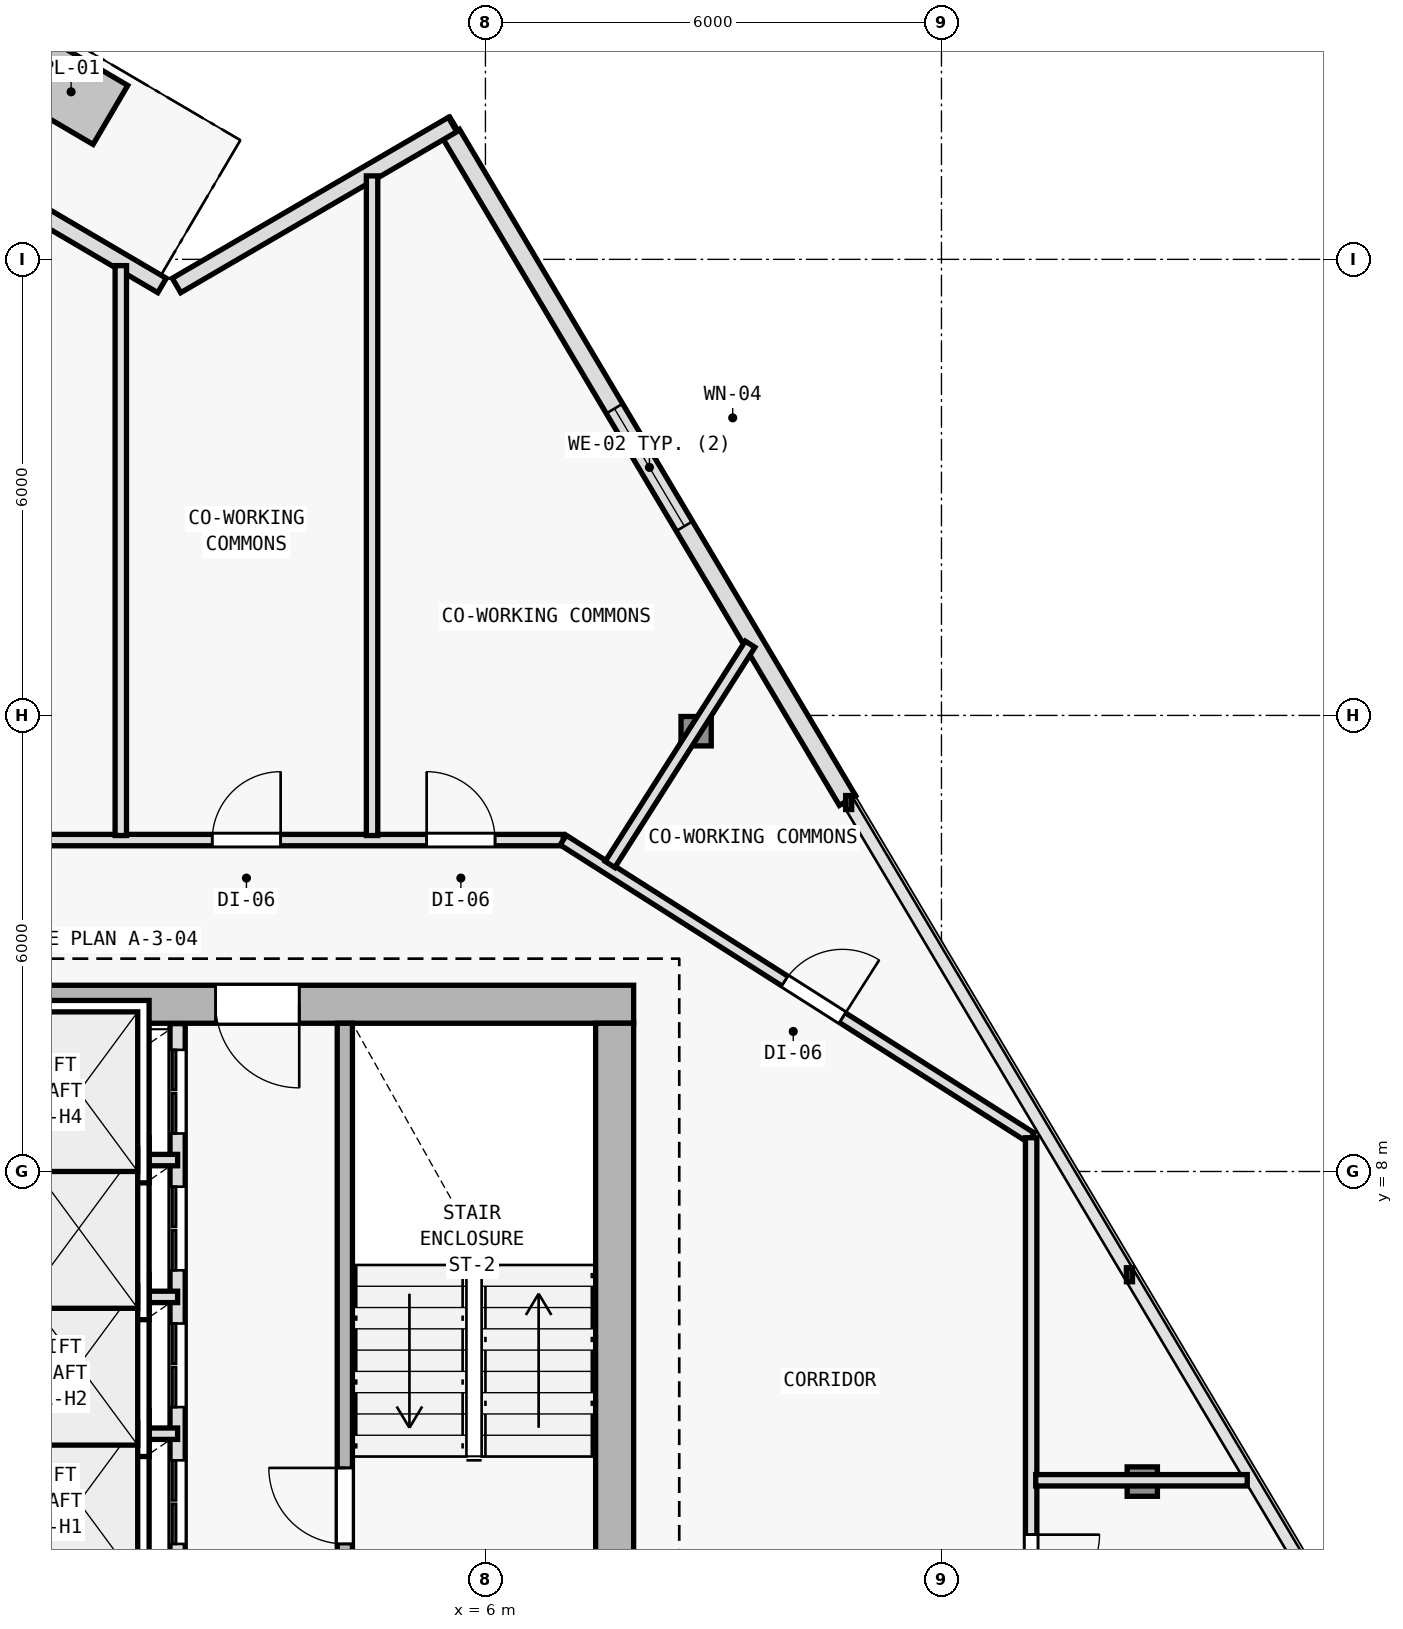
"""IFC4 building model, lengths in metres.
Left out: names, types, materials, properties, quantities, classifications, styles, units other than length and angle.
Written with IfcOpenShell. Run it as: python <this file> out.ifc"""

import sys

from ifc_helpers import new_model, si_unit, direction, frame, frame_2d, origin, origin_2d, place, context, subcontext, project, spatial, rectangle, i_section, extrude, element, fill, save


model = new_model("IFC4")
c1 = context("Model", 3, precision=1e-05, world=origin(), true_north=direction((0.0, 1.0)))
c2 = subcontext(c1, "Body", "Model", "MODEL_VIEW")
j1 = project(units=[si_unit("LENGTHUNIT", "METRE"), si_unit("PLANEANGLEUNIT", "RADIAN")], contexts=[c1])
p1 = place(None, origin())
s1 = spatial("IfcSite", under=j1, at=p1, CompositionType="ELEMENT")
p2 = place(p1, origin())
s2 = spatial("IfcBuilding", under=s1, at=p2, CompositionType="ELEMENT")
p3 = place(p2, frame((0.0, 0.0, 212.7)))
s3 = spatial("IfcBuildingStorey", under=s2, at=p3, CompositionType="ELEMENT", Elevation=212.7)
p4 = place(p3, frame((7.7, 10.2, 0.0), z_axis=(0.0, 0.0, 1.0), x_axis=(1.0, 0.0, 0.0)))
e1 = element("IfcColumn", 1, at=p4, inside=s3, PredefinedType="COLUMN", context=c2, shape_type="SweptSolid", body=[
    extrude(i_section(OverallWidth=0.398, OverallDepth=0.387, WebThickness=0.013, FlangeThickness=0.022, FilletRadius=0.015, at=origin_2d()), origin(), (0.0, 0.0, 1.0), 3.6),
])
p5 = place(p3, frame((14.642, 3.92, 0.006), z_axis=(-0.018907326549, 0.00952167524, 0.999775900241), x_axis=(-0.449781931574, -0.893138406984, 0.0)))
e2 = element("IfcColumn", 2, at=p5, inside=s3, PredefinedType="COLUMN", context=c2, shape_type="SweptSolid", body=[
    extrude(i_section(OverallWidth=0.398, OverallDepth=0.387, WebThickness=0.013, FlangeThickness=0.022, FilletRadius=0.015, at=origin_2d()), origin(), (0.0, 0.0, 1.0), 3.59),
])
p6 = place(p3, frame((8.772, 13.792, 0.006), z_axis=(-0.011767853257, -0.00258484638, 0.999927415465), x_axis=(0.214538664031, -0.976715496773, 0.0)))
e3 = element("IfcColumn", 3, at=p6, inside=s3, PredefinedType="COLUMN", context=c2, shape_type="SweptSolid", body=[
    extrude(i_section(OverallWidth=0.398, OverallDepth=0.387, WebThickness=0.013, FlangeThickness=0.022, FilletRadius=0.015, at=origin_2d()), origin(), (0.0, 0.0, 1.0), 3.589),
])
p7 = place(p3, frame((5.551, 21.647, 0.0), z_axis=(0.0, 0.0, 1.0), x_axis=(0.511094988088, -0.859524236512, 0.0)))
e4 = element("IfcWall", 4, at=p7, inside=s3, PredefinedType="SOLIDWALL", context=c2, shape_type="SweptSolid", body=[
    extrude(rectangle(XDim=10.2, YDim=0.25, at=frame_2d((5.1, 0.0))), origin(), (0.0, 0.0, 1.0), 3.35),
])
p8 = place(p7, frame((4.2, 0.0, 0.62)))
e5 = element("IfcOpeningElement", 5, at=p8, cuts=e4, PredefinedType="OPENING", context=c2, shape_type="SweptSolid", body=[
    extrude(rectangle(XDim=1.8, YDim=2.1, at=frame_2d((0.9, 1.05))), frame((0.0, 0.135, 0.0), z_axis=(0.0, -1.0, 0.0), x_axis=(1.0, 0.0, 0.0)), (0.0, 0.0, 1.0), 0.27),
])
p9 = place(p3, frame((1.935, 19.656, 0.0), z_axis=(0.0, 0.0, 1.0), x_axis=(0.863987356641, 0.503513502862, 0.0)))
e6 = element("IfcWall", 6, at=p9, inside=s3, PredefinedType="SOLIDWALL", context=c2, shape_type="SweptSolid", body=[
    extrude(rectangle(XDim=4.204, YDim=0.22, at=frame_2d((2.102, 0.0))), origin(), (0.0, 0.0, 1.0), 3.35),
])
p10 = place(p3, frame((-2.259, 22.01, 0.0), z_axis=(0.0, 0.0, 1.0), x_axis=(0.862123324624, -0.506698503193, 0.0)))
e7 = element("IfcWall", 7, at=p10, inside=s3, PredefinedType="SOLIDWALL", context=c2, shape_type="SweptSolid", body=[
    extrude(rectangle(XDim=4.645, YDim=0.22, at=frame_2d((2.322, 0.0))), origin(), (0.0, 0.0, 1.0), 3.35),
])
p11 = place(p10, frame((0.948, 0.0, 0.0)))
e8 = element("IfcOpeningElement", 8, at=p11, cuts=e7, PredefinedType="OPENING", context=c2, shape_type="SweptSolid", body=[
    extrude(rectangle(XDim=1.05, YDim=2.15, at=frame_2d((0.525, 1.075))), frame((0.0, 0.12, 0.0), z_axis=(0.0, -1.0, 0.0), x_axis=(1.0, 0.0, 0.0)), (0.0, 0.0, 1.0), 0.24),
])
p12 = place(p3, frame((7.95, 10.2, 0.0), z_axis=(0.0, 0.0, 1.0), x_axis=(-1.0, 0.0, 0.0)))
e9 = element("IfcWall", 9, at=p12, inside=s3, PredefinedType="SHEAR", context=c2, shape_type="SweptSolid", body=[
    extrude(rectangle(XDim=15.9, YDim=0.5, at=frame_2d((7.95, 0.0))), origin(), (0.0, 0.0, 1.0), 3.35),
])
p13 = place(p12, frame((4.4, 0.0, 0.0)))
e10 = element("IfcOpeningElement", 10, at=p13, cuts=e9, PredefinedType="OPENING", context=c2, shape_type="SweptSolid", body=[
    extrude(rectangle(XDim=1.1, YDim=2.15, at=frame_2d((0.55, 1.075))), frame((0.0, 0.26, 0.0), z_axis=(0.0, -1.0, 0.0), x_axis=(1.0, 0.0, 0.0)), (0.0, 0.0, 1.0), 0.52),
])
p14 = place(p3, frame((7.7, 9.95, 0.0), z_axis=(0.0, 0.0, 1.0), x_axis=(0.0, -1.0, 0.0)))
e11 = element("IfcWall", 11, at=p14, inside=s3, PredefinedType="SHEAR", context=c2, shape_type="SweptSolid", body=[
    extrude(rectangle(XDim=19.1, YDim=0.5, at=frame_2d((9.55, 0.0))), origin(), (0.0, 0.0, 1.0), 3.35),
])
p15 = place(p3, frame((4.15, 2.75, 0.0), z_axis=(0.0, 0.0, 1.0), x_axis=(0.0, 1.0, 0.0)))
e12 = element("IfcWall", 12, at=p15, inside=s3, PredefinedType="SOLIDWALL", context=c2, shape_type="SweptSolid", body=[
    extrude(rectangle(XDim=7.2, YDim=0.2, at=frame_2d((3.6, 0.0))), origin(), (0.0, 0.0, 1.0), 3.35),
])
p16 = place(p15, frame((0.35, 0.0, 0.0)))
e13 = element("IfcOpeningElement", 13, at=p16, cuts=e12, PredefinedType="OPENING", context=c2, shape_type="SweptSolid", body=[
    extrude(rectangle(XDim=1.0, YDim=2.15, at=frame_2d((0.5, 1.075))), frame((0.0, 0.11, 0.0), z_axis=(0.0, -1.0, 0.0), x_axis=(1.0, 0.0, 0.0)), (0.0, 0.0, 1.0), 0.22),
])
p17 = place(p3, frame((1.95, 2.65, 0.0), z_axis=(0.0, 0.0, 1.0), x_axis=(0.0, 1.0, 0.0)))
e14 = element("IfcWall", 14, at=p17, inside=s3, PredefinedType="SOLIDWALL", context=c2, shape_type="SweptSolid", body=[
    extrude(rectangle(XDim=7.295, YDim=0.2, at=frame_2d((3.647, 0.0))), origin(), (0.0, 0.0, 1.0), 3.35),
])
p18 = place(p17, frame((0.45, 0.0, 0.0)))
e15 = element("IfcOpeningElement", 15, at=p18, cuts=e14, PredefinedType="OPENING", context=c2, shape_type="SweptSolid", body=[
    extrude(rectangle(XDim=1.1, YDim=2.15, at=frame_2d((0.55, 1.075))), frame((0.0, 0.11, 0.0), z_axis=(0.0, -1.0, 0.0), x_axis=(1.0, 0.0, 0.0)), (0.0, 0.0, 1.0), 0.22),
])
p19 = place(p17, frame((2.25, 0.0, 0.0)))
e16 = element("IfcOpeningElement", 16, at=p19, cuts=e14, PredefinedType="OPENING", context=c2, shape_type="SweptSolid", body=[
    extrude(rectangle(XDim=1.1, YDim=2.15, at=frame_2d((0.55, 1.075))), frame((0.0, 0.11, 0.0), z_axis=(0.0, -1.0, 0.0), x_axis=(1.0, 0.0, 0.0)), (0.0, 0.0, 1.0), 0.22),
])
p20 = place(p17, frame((4.05, 0.0, 0.0)))
e17 = element("IfcOpeningElement", 17, at=p20, cuts=e14, PredefinedType="OPENING", context=c2, shape_type="SweptSolid", body=[
    extrude(rectangle(XDim=1.1, YDim=2.15, at=frame_2d((0.55, 1.075))), frame((0.0, 0.11, 0.0), z_axis=(0.0, -1.0, 0.0), x_axis=(1.0, 0.0, 0.0)), (0.0, 0.0, 1.0), 0.22),
])
p21 = place(p17, frame((5.85, 0.0, 0.0)))
e18 = element("IfcOpeningElement", 18, at=p21, cuts=e14, PredefinedType="OPENING", context=c2, shape_type="SweptSolid", body=[
    extrude(rectangle(XDim=1.1, YDim=2.15, at=frame_2d((0.55, 1.075))), frame((0.0, 0.11, 0.0), z_axis=(0.0, -1.0, 0.0), x_axis=(1.0, 0.0, 0.0)), (0.0, 0.0, 1.0), 0.22),
])
for number, where, z_axis, x_axis in (
    (19, (-0.75, 4.55, 0.0), (0.0, 0.0, 1.0), (1.0, 0.0, 0.0)),
    (20, (-0.75, 6.35, 0.0), (0.0, 0.0, 1.0), (1.0, 0.0, 0.0)),
    (21, (-0.75, 8.15, 0.0), (0.0, 0.0, 1.0), (1.0, 0.0, 0.0)),
):
    element("IfcWall", number, at=place(p3, frame(where, z_axis=z_axis, x_axis=x_axis)), inside=s3, PredefinedType="PARTITIONING", context=c2, shape_type="SweptSolid", body=[
        extrude(rectangle(XDim=2.7, YDim=0.15, at=frame_2d((1.35, 0.0))), origin(), (0.0, 0.0, 1.0), 3.35),
    ])
p22 = place(p3, frame((-7.041, 12.36, 0.0), z_axis=(0.0, 0.0, 1.0), x_axis=(1.0, 0.0, 0.0)))
e22 = element("IfcWall", 22, at=p22, inside=s3, PredefinedType="PARTITIONING", context=c2, shape_type="SweptSolid", body=[
    extrude(rectangle(XDim=14.064, YDim=0.15, at=frame_2d((7.032, 0.0))), origin(), (0.0, 0.0, 1.0), 2.975),
])
p23 = place(p22, frame((12.268, 0.0, 0.0)))
e23 = element("IfcOpeningElement", 23, at=p23, cuts=e22, PredefinedType="OPENING", context=c2, shape_type="SweptSolid", body=[
    extrude(rectangle(XDim=0.9, YDim=2.1, at=frame_2d((0.45, 1.05))), frame((0.0, 0.085, 0.0), z_axis=(0.0, -1.0, 0.0), x_axis=(1.0, 0.0, 0.0)), (0.0, 0.0, 1.0), 0.17),
])
p24 = place(p22, frame((9.447, 0.0, 0.0)))
e24 = element("IfcOpeningElement", 24, at=p24, cuts=e22, PredefinedType="OPENING", context=c2, shape_type="SweptSolid", body=[
    extrude(rectangle(XDim=0.9, YDim=2.1, at=frame_2d((0.45, 1.05))), frame((0.0, 0.085, 0.0), z_axis=(0.0, -1.0, 0.0), x_axis=(1.0, 0.0, 0.0)), (0.0, 0.0, 1.0), 0.17),
])
p25 = place(p22, frame((3.997, 0.0, 0.0)))
e25 = element("IfcOpeningElement", 25, at=p25, cuts=e22, PredefinedType="OPENING", context=c2, shape_type="SweptSolid", body=[
    extrude(rectangle(XDim=0.9, YDim=2.1, at=frame_2d((0.45, 1.05))), frame((0.0, 0.085, 0.0), z_axis=(0.0, -1.0, 0.0), x_axis=(1.0, 0.0, 0.0)), (0.0, 0.0, 1.0), 0.17),
])
p26 = place(p3, frame((7.023, 12.36, 0.0), z_axis=(0.0, 0.0, 1.0), x_axis=(0.84376480085, -0.536713108511, 0.0)))
e26 = element("IfcWall", 26, at=p26, inside=s3, PredefinedType="PARTITIONING", context=c2, shape_type="SweptSolid", body=[
    extrude(rectangle(XDim=7.297, YDim=0.15, at=frame_2d((3.648, 0.0))), origin(), (0.0, 0.0, 1.0), 2.725),
])
p27 = place(p26, frame((3.455, 0.0, 0.0)))
e27 = element("IfcOpeningElement", 27, at=p27, cuts=e26, PredefinedType="OPENING", context=c2, shape_type="SweptSolid", body=[
    extrude(rectangle(XDim=0.9, YDim=2.1, at=frame_2d((0.45, 1.05))), frame((0.0, 0.085, 0.0), z_axis=(0.0, -1.0, 0.0), x_axis=(1.0, 0.0, 0.0)), (0.0, 0.0, 1.0), 0.17),
])
p28 = place(p3, frame((13.18, 8.444, 0.0), z_axis=(0.0, 0.0, 1.0), x_axis=(0.0, -1.0, 0.0)))
e28 = element("IfcWall", 28, at=p28, inside=s3, PredefinedType="PARTITIONING", context=c2, shape_type="SweptSolid", body=[
    extrude(rectangle(XDim=20.004, YDim=0.15, at=frame_2d((10.002, 0.0))), origin(), (0.0, 0.0, 1.0), 2.825),
])
p29 = place(p28, frame((16.641, 0.0, 0.0)))
e29 = element("IfcOpeningElement", 29, at=p29, cuts=e28, PredefinedType="OPENING", context=c2, shape_type="SweptSolid", body=[
    extrude(rectangle(XDim=0.9, YDim=2.1, at=frame_2d((0.45, 1.05))), frame((0.0, 0.085, 0.0), z_axis=(0.0, -1.0, 0.0), x_axis=(1.0, 0.0, 0.0)), (0.0, 0.0, 1.0), 0.17),
])
p30 = place(p28, frame((12.83, 0.0, 0.0)))
e30 = element("IfcOpeningElement", 30, at=p30, cuts=e28, PredefinedType="OPENING", context=c2, shape_type="SweptSolid", body=[
    extrude(rectangle(XDim=0.9, YDim=2.1, at=frame_2d((0.45, 1.05))), frame((0.0, 0.085, 0.0), z_axis=(0.0, -1.0, 0.0), x_axis=(1.0, 0.0, 0.0)), (0.0, 0.0, 1.0), 0.17),
])
p31 = place(p28, frame((10.324, 0.0, 0.0)))
e31 = element("IfcOpeningElement", 31, at=p31, cuts=e28, PredefinedType="OPENING", context=c2, shape_type="SweptSolid", body=[
    extrude(rectangle(XDim=0.9, YDim=2.1, at=frame_2d((0.45, 1.05))), frame((0.0, 0.085, 0.0), z_axis=(0.0, -1.0, 0.0), x_axis=(1.0, 0.0, 0.0)), (0.0, 0.0, 1.0), 0.17),
])
p32 = place(p28, frame((7.641, 0.0, 0.0)))
e32 = element("IfcOpeningElement", 32, at=p32, cuts=e28, PredefinedType="OPENING", context=c2, shape_type="SweptSolid", body=[
    extrude(rectangle(XDim=0.9, YDim=2.1, at=frame_2d((0.45, 1.05))), frame((0.0, 0.085, 0.0), z_axis=(0.0, -1.0, 0.0), x_axis=(1.0, 0.0, 0.0)), (0.0, 0.0, 1.0), 0.17),
])
p33 = place(p28, frame((5.222, 0.0, 0.0)))
e33 = element("IfcOpeningElement", 33, at=p33, cuts=e28, PredefinedType="OPENING", context=c2, shape_type="SweptSolid", body=[
    extrude(rectangle(XDim=0.9, YDim=2.1, at=frame_2d((0.45, 1.05))), frame((0.0, 0.085, 0.0), z_axis=(0.0, -1.0, 0.0), x_axis=(1.0, 0.0, 0.0)), (0.0, 0.0, 1.0), 0.17),
])
p34 = place(p3, frame((13.24, 3.938, 0.0), z_axis=(0.0, 0.0, 1.0), x_axis=(1.0, 0.0, 0.0)))
e34 = element("IfcWall", 34, at=p34, inside=s3, PredefinedType="PARTITIONING", context=c2, shape_type="SweptSolid", body=[
    extrude(rectangle(XDim=2.783, YDim=0.15, at=frame_2d((1.392, 0.0))), origin(), (0.0, 0.0, 1.0), 2.975),
])
p35 = place(p3, frame((7.639, 12.04, 0.0), z_axis=(0.0, 0.0, 1.0), x_axis=(0.536691494808, 0.843778548791, 0.0)))
e35 = element("IfcWall", 35, at=p35, inside=s3, PredefinedType="PARTITIONING", context=c2, shape_type="SweptSolid", body=[
    extrude(rectangle(XDim=3.435, YDim=0.15, at=frame_2d((1.717, 0.0))), origin(), (0.0, 0.0, 1.0), 2.975),
])
p36 = place(p3, frame((1.202, 12.42, 0.0), z_axis=(0.0, 0.0, 1.0), x_axis=(0.0, 1.0, 0.0)))
e36 = element("IfcWall", 36, at=p36, inside=s3, PredefinedType="PARTITIONING", context=c2, shape_type="SweptSolid", body=[
    extrude(rectangle(XDim=7.498, YDim=0.15, at=frame_2d((3.749, 0.0))), origin(), (0.0, 0.0, 1.0), 2.975),
])
p37 = place(p3, frame((4.508, 12.42, 0.0), z_axis=(0.0, 0.0, 1.0), x_axis=(0.0, 1.0, 0.0)))
e37 = element("IfcWall", 37, at=p37, inside=s3, PredefinedType="PARTITIONING", context=c2, shape_type="SweptSolid", body=[
    extrude(rectangle(XDim=8.678, YDim=0.15, at=frame_2d((4.339, 0.0))), origin(), (0.0, 0.0, 1.0), 2.975),
])
p38 = place(p8, origin())
e38 = element("IfcWindow", 38, at=p38, inside=s3, PartitioningType="SINGLE_PANEL", PredefinedType="WINDOW", context=c2, shape_type="SweptSolid", body=[
    extrude(rectangle(XDim=1.8, YDim=2.1, at=frame_2d((0.9, 1.05))), frame((0.0, 0.03, 0.0), z_axis=(0.0, -1.0, 0.0), x_axis=(1.0, 0.0, 0.0)), (0.0, 0.0, 1.0), 0.06),
])
fill(e5, e38)
p39 = place(p13, origin())
e39 = element("IfcDoor", 39, at=p39, inside=s3, OperationType="SINGLE_SWING_LEFT", PredefinedType="DOOR", context=c2, shape_type="SweptSolid", body=[
    extrude(rectangle(XDim=1.1, YDim=2.15, at=frame_2d((0.55, 1.075))), frame((0.0, 0.025, 0.0), z_axis=(0.0, -1.0, 0.0), x_axis=(1.0, 0.0, 0.0)), (0.0, 0.0, 1.0), 0.05),
])
fill(e10, e39)
p40 = place(p16, origin())
e40 = element("IfcDoor", 40, at=p40, inside=s3, OperationType="SINGLE_SWING_RIGHT", PredefinedType="DOOR", context=c2, shape_type="SweptSolid", body=[
    extrude(rectangle(XDim=1.0, YDim=2.15, at=frame_2d((0.5, 1.075))), frame((0.0, 0.025, 0.0), z_axis=(0.0, -1.0, 0.0), x_axis=(1.0, 0.0, 0.0)), (0.0, 0.0, 1.0), 0.05),
])
fill(e13, e40)
p41 = place(p18, origin())
e41 = element("IfcDoor", 41, at=p41, inside=s3, OperationType="DOUBLE_DOOR_SLIDING", PredefinedType="DOOR", context=c2, shape_type="SweptSolid", body=[
    extrude(rectangle(XDim=1.1, YDim=2.15, at=frame_2d((0.55, 1.075))), frame((0.0, 0.025, 0.0), z_axis=(0.0, -1.0, 0.0), x_axis=(1.0, 0.0, 0.0)), (0.0, 0.0, 1.0), 0.05),
])
fill(e15, e41)
p42 = place(p19, origin())
e42 = element("IfcDoor", 42, at=p42, inside=s3, OperationType="DOUBLE_DOOR_SLIDING", PredefinedType="DOOR", context=c2, shape_type="SweptSolid", body=[
    extrude(rectangle(XDim=1.1, YDim=2.15, at=frame_2d((0.55, 1.075))), frame((0.0, 0.025, 0.0), z_axis=(0.0, -1.0, 0.0), x_axis=(1.0, 0.0, 0.0)), (0.0, 0.0, 1.0), 0.05),
])
fill(e16, e42)
p43 = place(p20, origin())
e43 = element("IfcDoor", 43, at=p43, inside=s3, OperationType="DOUBLE_DOOR_SLIDING", PredefinedType="DOOR", context=c2, shape_type="SweptSolid", body=[
    extrude(rectangle(XDim=1.1, YDim=2.15, at=frame_2d((0.55, 1.075))), frame((0.0, 0.025, 0.0), z_axis=(0.0, -1.0, 0.0), x_axis=(1.0, 0.0, 0.0)), (0.0, 0.0, 1.0), 0.05),
])
fill(e17, e43)
p44 = place(p21, origin())
e44 = element("IfcDoor", 44, at=p44, inside=s3, OperationType="DOUBLE_DOOR_SLIDING", PredefinedType="DOOR", context=c2, shape_type="SweptSolid", body=[
    extrude(rectangle(XDim=1.1, YDim=2.15, at=frame_2d((0.55, 1.075))), frame((0.0, 0.025, 0.0), z_axis=(0.0, -1.0, 0.0), x_axis=(1.0, 0.0, 0.0)), (0.0, 0.0, 1.0), 0.05),
])
fill(e18, e44)
p45 = place(p33, origin())
e45 = element("IfcDoor", 45, at=p45, inside=s3, OperationType="SINGLE_SWING_LEFT", PredefinedType="DOOR", context=c2, shape_type="SweptSolid", body=[
    extrude(rectangle(XDim=0.9, YDim=2.1, at=frame_2d((0.45, 1.05))), frame((0.0, 0.025, 0.0), z_axis=(0.0, -1.0, 0.0), x_axis=(1.0, 0.0, 0.0)), (0.0, 0.0, 1.0), 0.05),
])
fill(e33, e45)
p46 = place(p27, origin())
e46 = element("IfcDoor", 46, at=p46, inside=s3, OperationType="SINGLE_SWING_RIGHT", PredefinedType="DOOR", context=c2, shape_type="SweptSolid", body=[
    extrude(rectangle(XDim=0.9, YDim=2.1, at=frame_2d((0.45, 1.05))), frame((0.0, 0.025, 0.0), z_axis=(0.0, -1.0, 0.0), x_axis=(1.0, 0.0, 0.0)), (0.0, 0.0, 1.0), 0.05),
])
fill(e27, e46)
p47 = place(p23, origin())
e47 = element("IfcDoor", 47, at=p47, inside=s3, OperationType="SINGLE_SWING_LEFT", PredefinedType="DOOR", context=c2, shape_type="SweptSolid", body=[
    extrude(rectangle(XDim=0.9, YDim=2.1, at=frame_2d((0.45, 1.05))), frame((0.0, 0.025, 0.0), z_axis=(0.0, -1.0, 0.0), x_axis=(1.0, 0.0, 0.0)), (0.0, 0.0, 1.0), 0.05),
])
fill(e23, e47)
p48 = place(p24, origin())
e48 = element("IfcDoor", 48, at=p48, inside=s3, OperationType="SINGLE_SWING_RIGHT", PredefinedType="DOOR", context=c2, shape_type="SweptSolid", body=[
    extrude(rectangle(XDim=0.9, YDim=2.1, at=frame_2d((0.45, 1.05))), frame((0.0, 0.025, 0.0), z_axis=(0.0, -1.0, 0.0), x_axis=(1.0, 0.0, 0.0)), (0.0, 0.0, 1.0), 0.05),
])
fill(e24, e48)
save(model, sys.argv[1])
